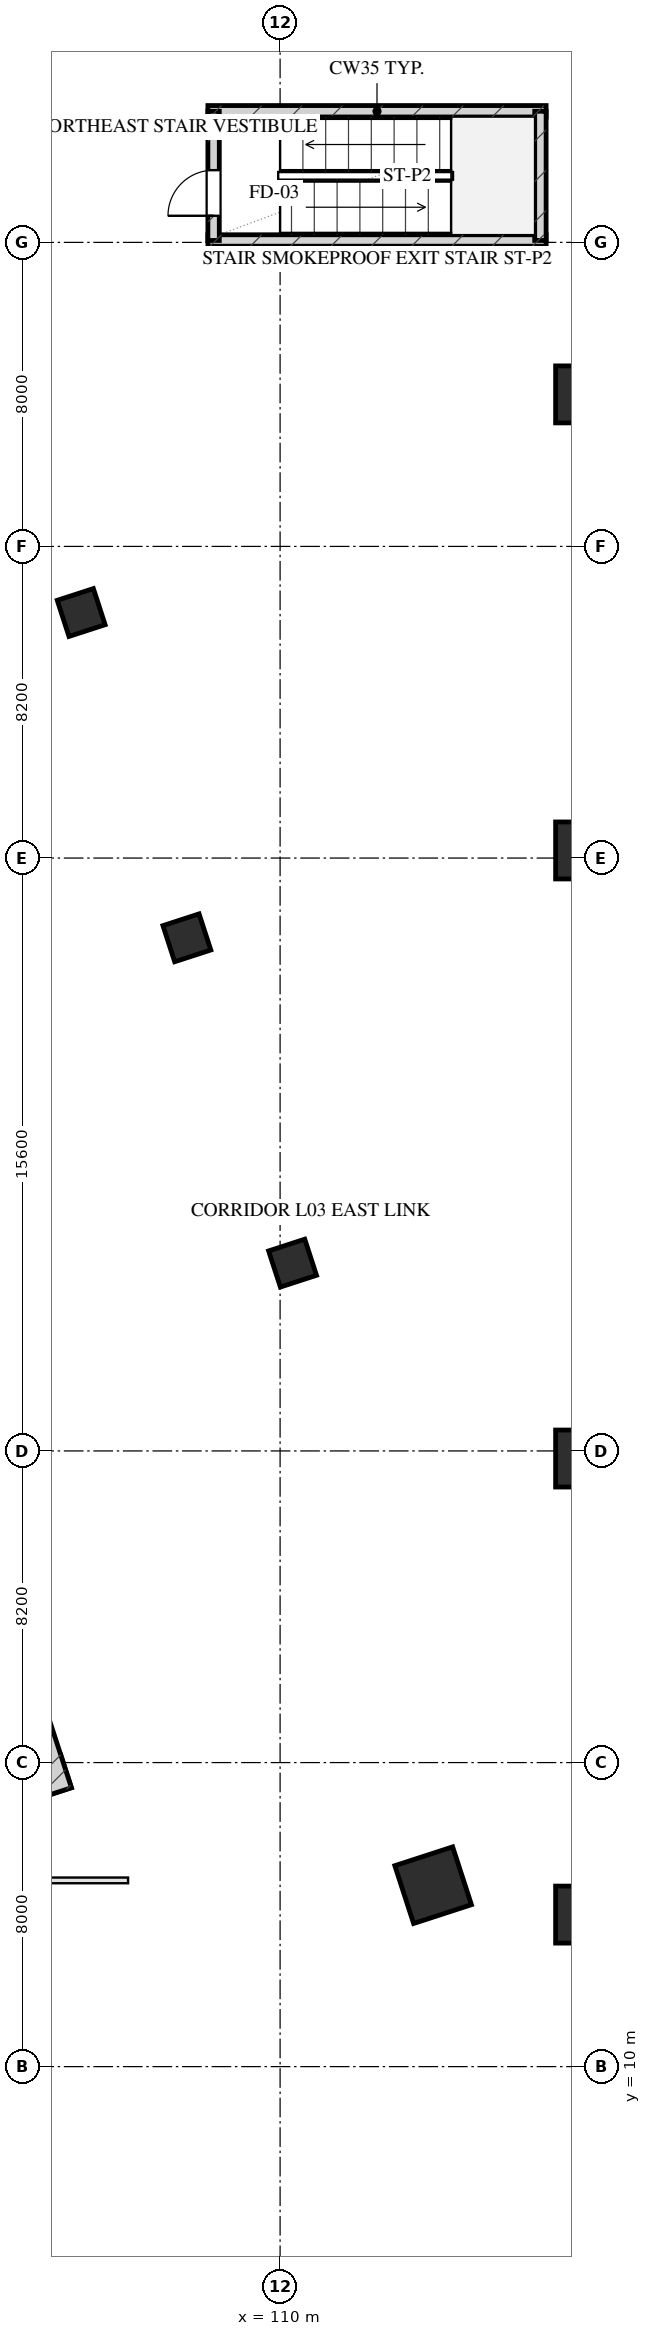
"""IFC4 building model, lengths in metres.
Left out: names, types, materials, properties, quantities, classifications, styles, units other than length and angle.
Written with IfcOpenShell. Run it as: python <this file> out.ifc"""

import sys

from ifc_helpers import new_model, si_unit, direction, frame, frame_2d, origin, origin_2d, place, context, subcontext, project, spatial, rectangle, hollow_rectangle, extrude, element, fill, save


model = new_model("IFC4")
c1 = context("Model", 3, precision=1e-05, world=origin(), true_north=direction((0.0, 1.0)))
c2 = subcontext(c1, "Body", "Model", "MODEL_VIEW")
j1 = project(units=[si_unit("LENGTHUNIT", "METRE"), si_unit("PLANEANGLEUNIT", "RADIAN")], contexts=[c1])
p1 = place(None, origin())
s1 = spatial("IfcSite", under=j1, at=p1, CompositionType="ELEMENT")
p2 = place(p1, origin())
s2 = spatial("IfcBuilding", under=s1, at=p2, CompositionType="ELEMENT")
p3 = place(p2, frame((0.0, 0.0, 16.5)))
s3 = spatial("IfcBuildingStorey", under=s2, at=p3, CompositionType="ELEMENT", Elevation=16.5)
p4 = place(p3, frame((88.487, 12.605, 0.0), z_axis=(0.0, 0.0, 1.0), x_axis=(0.951055016115, 0.309021611416, 0.0)))
e1 = element("IfcWall", 1, at=p4, inside=s3, PredefinedType="SHEAR", context=c2, shape_type="SweptSolid", body=[
    extrude(rectangle(XDim=16.7, YDim=0.9, at=frame_2d((8.35, 0.0))), origin(), (0.0, 0.0, 1.0), 5.5),
])
p5 = place(p3, frame((101.059, 26.5, 0.0), z_axis=(0.0, 0.0, 1.0), x_axis=(0.309021722829, -0.951054979914, 0.0)))
e2 = element("IfcWall", 2, at=p5, inside=s3, PredefinedType="SHEAR", context=c2, shape_type="SweptSolid", body=[
    extrude(rectangle(XDim=9.78, YDim=0.9, at=frame_2d((4.89, 0.0))), origin(), (0.0, 0.0, 1.0), 5.5),
])
for number, where, z_axis, x_axis in (
    (3, (108.1, 58.05, 0.0), (0.0, 0.0, 1.0), (1.0, 0.0, 0.0)),
    (4, (108.1, 61.45, 0.0), (0.0, 0.0, 1.0), (1.0, 0.0, 0.0)),
):
    element("IfcWall", number, at=place(p3, frame(where, z_axis=z_axis, x_axis=x_axis)), inside=s3, PredefinedType="SHEAR", context=c2, shape_type="SweptSolid", body=[
        extrude(rectangle(XDim=8.9, YDim=0.3, at=frame_2d((4.45, 0.0))), origin(), (0.0, 0.0, 1.0), 5.5),
    ])
p6 = place(p3, frame((116.85, 58.05, 0.0), z_axis=(0.0, 0.0, 1.0), x_axis=(0.0, 1.0, 0.0)))
e5 = element("IfcWall", 5, at=p6, inside=s3, PredefinedType="SHEAR", context=c2, shape_type="SweptSolid", body=[
    extrude(rectangle(XDim=3.4, YDim=0.3, at=frame_2d((1.7, 0.0))), origin(), (0.0, 0.0, 1.0), 5.5),
])
p7 = place(p3, frame((108.25, 58.05, 0.0), z_axis=(0.0, 0.0, 1.0), x_axis=(0.0, 1.0, 0.0)))
e6 = element("IfcWall", 6, at=p7, inside=s3, PredefinedType="SHEAR", context=c2, shape_type="SweptSolid", body=[
    extrude(rectangle(XDim=3.4, YDim=0.3, at=frame_2d((1.7, 0.0))), origin(), (0.0, 0.0, 1.0), 5.5),
])
p8 = place(p7, frame((0.65, 0.0, 0.0)))
e7 = element("IfcOpeningElement", 7, at=p8, cuts=e6, PredefinedType="OPENING", context=c2, shape_type="SweptSolid", body=[
    extrude(rectangle(XDim=1.2, YDim=2.05, at=frame_2d((0.6, 1.025))), frame((0.0, 0.16, 0.0), z_axis=(0.0, -1.0, 0.0), x_axis=(1.0, 0.0, 0.0)), (0.0, 0.0, 1.0), 0.32),
])
for number, where, z_axis, x_axis in (
    (8, (118.0, 14.0, 0.0), (0.0, 0.0, 1.0), (1.0, 0.0, 0.0)),
    (9, (118.0, 26.0, 0.0), (0.0, 0.0, 1.0), (1.0, 0.0, 0.0)),
    (10, (118.0, 42.0, 0.0), (0.0, 0.0, 1.0), (1.0, 0.0, 0.0)),
    (11, (118.0, 54.0, 0.0), (0.0, 0.0, 1.0), (1.0, 0.0, 0.0)),
):
    element("IfcColumn", number, at=place(p3, frame(where, z_axis=z_axis, x_axis=x_axis)), inside=s3, PredefinedType="COLUMN", context=c2, shape_type="SweptSolid", body=[
        extrude(rectangle(XDim=1.5, YDim=1.5, at=origin_2d()), origin(), (0.0, 0.0, 1.0), 5.501),
    ])
p9 = place(p3, frame((114.027, 14.774, 0.0), z_axis=(0.0, 0.0, 1.0), x_axis=(0.951056516295, 0.309016994375, 0.0)))
e12 = element("IfcColumn", 12, at=p9, inside=s3, PredefinedType="COLUMN", context=c2, shape_type="SweptSolid", body=[
    extrude(hollow_rectangle(XDim=1.6, YDim=1.6, WallThickness=0.055, at=origin_2d()), origin(), (0.0, 0.0, 1.0), 5.501),
])
for number, where, z_axis, x_axis in (
    (13, (110.328, 31.142, 0.0), (0.0, 0.0, 1.0), (0.951, 0.309, 0.0)),
    (14, (107.547, 39.701, 0.0), (0.0, 0.0, 1.0), (0.951, 0.309, 0.0)),
    (15, (104.766, 48.261, 0.0), (0.0, 0.0, 1.0), (0.951, 0.309, 0.0)),
):
    element("IfcColumn", number, at=place(p3, frame(where, z_axis=z_axis, x_axis=x_axis)), inside=s3, PredefinedType="COLUMN", context=c2, shape_type="SweptSolid", body=[
        extrude(hollow_rectangle(XDim=1.0, YDim=1.0, WallThickness=0.036, at=origin_2d()), origin(), (0.0, 0.0, 1.0), 5.501),
    ])
p10 = place(p3, frame((18.0, 14.9, 0.0), z_axis=(0.0, 0.0, 1.0), x_axis=(1.0, 0.0, 0.0)))
e16 = element("IfcWall", 16, at=p10, inside=s3, PredefinedType="PARTITIONING", context=c2, shape_type="SweptSolid", body=[
    extrude(rectangle(XDim=88.0, YDim=0.15, at=frame_2d((44.0, 0.0))), origin(), (0.0, 0.0, 1.0), 2.325),
])
p11 = place(p10, frame((21.8, 0.0, 0.0)))
e17 = element("IfcOpeningElement", 17, at=p11, cuts=e16, PredefinedType="OPENING", context=c2, shape_type="SweptSolid", body=[
    extrude(rectangle(XDim=1.5, YDim=2.05, at=frame_2d((0.75, 1.025))), frame((0.0, 0.085, 0.0), z_axis=(0.0, -1.0, 0.0), x_axis=(1.0, 0.0, 0.0)), (0.0, 0.0, 1.0), 0.17),
])
p12 = place(p8, origin())
e18 = element("IfcDoor", 18, at=p12, inside=s3, OperationType="SINGLE_SWING_LEFT", PredefinedType="DOOR", context=c2, shape_type="SweptSolid", body=[
    extrude(rectangle(XDim=1.2, YDim=2.05, at=frame_2d((0.6, 1.025))), frame((0.0, 0.025, 0.0), z_axis=(0.0, -1.0, 0.0), x_axis=(1.0, 0.0, 0.0)), (0.0, 0.0, 1.0), 0.05),
])
fill(e7, e18)
save(model, sys.argv[1])
